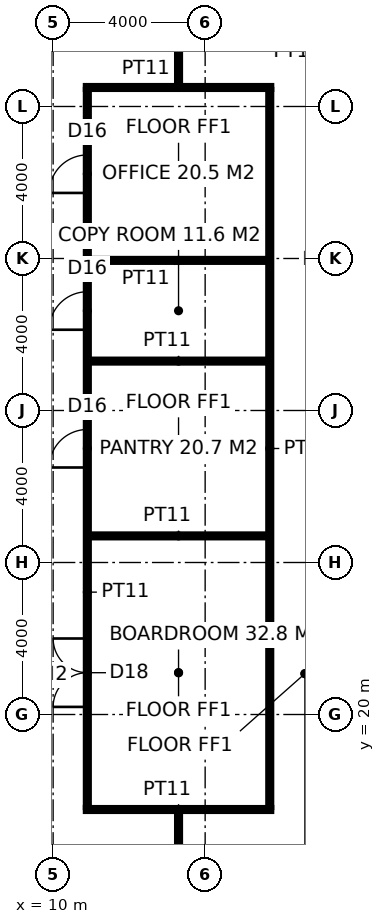
"""IFC4 building model, lengths in metres.
Left out: names, types, materials, properties, quantities, classifications, styles, units other than length and angle.
Written with IfcOpenShell. Run it as: python <this file> out.ifc"""

import sys

from ifc_helpers import new_model, si_unit, direction, frame, frame_2d, origin, place, context, subcontext, project, spatial, rectangle, extrude, element, fill, save


model = new_model("IFC4")
c1 = context("Model", 3, precision=1e-05, world=origin(), true_north=direction((0.0, 1.0)))
c2 = subcontext(c1, "Body", "Model", "MODEL_VIEW")
j1 = project(units=[si_unit("LENGTHUNIT", "METRE"), si_unit("PLANEANGLEUNIT", "RADIAN")], contexts=[c1])
p1 = place(None, origin())
s1 = spatial("IfcSite", under=j1, at=p1, CompositionType="ELEMENT")
p2 = place(p1, origin())
s2 = spatial("IfcBuilding", under=s1, at=p2, CompositionType="ELEMENT")
p3 = place(p2, frame((0.0, 0.0, 274.2)))
s3 = spatial("IfcBuildingStorey", under=s2, at=p3, CompositionType="ELEMENT", Elevation=274.2)
p4 = place(p3, frame((10.85, 17.5, 0.0), z_axis=(0.0, 0.0, 1.0), x_axis=(1.0, 0.0, 0.0)))
e1 = element("IfcWall", 1, at=p4, inside=s3, PredefinedType="PARTITIONING", context=c2, shape_type="SweptSolid", body=[
    extrude(rectangle(XDim=4.9, YDim=0.1, at=frame_2d((2.45, 0.0))), origin(), (0.0, 0.0, 1.0), 3.85),
])
for number, where, z_axis, x_axis in (
    (2, (10.95, 24.7, 0.0), (0.0, 0.0, 1.0), (1.0, 0.0, 0.0)),
    (3, (10.95, 29.3, 0.0), (0.0, 0.0, 1.0), (1.0, 0.0, 0.0)),
):
    element("IfcWall", number, at=place(p3, frame(where, z_axis=z_axis, x_axis=x_axis)), inside=s3, PredefinedType="PARTITIONING", context=c2, shape_type="SweptSolid", body=[
        extrude(rectangle(XDim=4.7, YDim=0.1, at=frame_2d((2.35, 0.0))), origin(), (0.0, 0.0, 1.0), 3.85),
    ])
p5 = place(p3, frame((10.95, 31.95, 0.0), z_axis=(0.0, 0.0, 1.0), x_axis=(1.0, 0.0, 0.0)))
e4 = element("IfcWall", 4, at=p5, inside=s3, PredefinedType="PARTITIONING", context=c2, shape_type="SweptSolid", body=[
    extrude(rectangle(XDim=4.7, YDim=0.1, at=frame_2d((2.35, 0.0))), origin(), (0.0, 0.0, 1.0), 2.95),
])
p6 = place(p3, frame((10.85, 36.5, 0.0), z_axis=(0.0, 0.0, 1.0), x_axis=(1.0, 0.0, 0.0)))
e5 = element("IfcWall", 5, at=p6, inside=s3, PredefinedType="PARTITIONING", context=c2, shape_type="SweptSolid", body=[
    extrude(rectangle(XDim=4.9, YDim=0.1, at=frame_2d((2.45, 0.0))), origin(), (0.0, 0.0, 1.0), 2.85),
])
p7 = place(p3, frame((10.9, 17.55, 0.0), z_axis=(0.0, 0.0, 1.0), x_axis=(0.0, 1.0, 0.0)))
e6 = element("IfcWall", 6, at=p7, inside=s3, PredefinedType="PARTITIONING", context=c2, shape_type="SweptSolid", body=[
    extrude(rectangle(XDim=18.9, YDim=0.1, at=frame_2d((9.45, 0.0))), origin(), (0.0, 0.0, 1.0), 3.85),
])
p8 = place(p7, frame((2.65, 0.0, 0.0)))
e7 = element("IfcOpeningElement", 7, at=p8, cuts=e6, PredefinedType="OPENING", context=c2, shape_type="SweptSolid", body=[
    extrude(rectangle(XDim=1.8, YDim=2.4, at=frame_2d((0.9, 1.2))), frame((0.0, 0.06, 0.0), z_axis=(0.0, -1.0, 0.0), x_axis=(1.0, 0.0, 0.0)), (0.0, 0.0, 1.0), 0.12),
])
p9 = place(p7, frame((8.95, 0.0, 0.0)))
e8 = element("IfcOpeningElement", 8, at=p9, cuts=e6, PredefinedType="OPENING", context=c2, shape_type="SweptSolid", body=[
    extrude(rectangle(XDim=1.0, YDim=2.2, at=frame_2d((0.5, 1.1))), frame((0.0, 0.06, 0.0), z_axis=(0.0, -1.0, 0.0), x_axis=(1.0, 0.0, 0.0)), (0.0, 0.0, 1.0), 0.12),
])
p10 = place(p7, frame((12.575, 0.0, 0.0)))
e9 = element("IfcOpeningElement", 9, at=p10, cuts=e6, PredefinedType="OPENING", context=c2, shape_type="SweptSolid", body=[
    extrude(rectangle(XDim=1.0, YDim=2.2, at=frame_2d((0.5, 1.1))), frame((0.0, 0.06, 0.0), z_axis=(0.0, -1.0, 0.0), x_axis=(1.0, 0.0, 0.0)), (0.0, 0.0, 1.0), 0.12),
])
p11 = place(p7, frame((16.175, 0.0, 0.0)))
e10 = element("IfcOpeningElement", 10, at=p11, cuts=e6, PredefinedType="OPENING", context=c2, shape_type="SweptSolid", body=[
    extrude(rectangle(XDim=1.0, YDim=2.2, at=frame_2d((0.5, 1.1))), frame((0.0, 0.06, 0.0), z_axis=(0.0, -1.0, 0.0), x_axis=(1.0, 0.0, 0.0)), (0.0, 0.0, 1.0), 0.12),
])
p12 = place(p3, frame((15.7, 17.55, 0.0), z_axis=(0.0, 0.0, 1.0), x_axis=(0.0, 1.0, 0.0)))
e11 = element("IfcWall", 11, at=p12, inside=s3, PredefinedType="PARTITIONING", context=c2, shape_type="SweptSolid", body=[
    extrude(rectangle(XDim=18.9, YDim=0.1, at=frame_2d((9.45, 0.0))), origin(), (0.0, 0.0, 1.0), 3.85),
])
p13 = place(p3, frame((13.3, 4.3, 0.0), z_axis=(0.0, 0.0, 1.0), x_axis=(0.0, 1.0, 0.0)))
e12 = element("IfcWall", 12, at=p13, inside=s3, PredefinedType="PARTITIONING", context=c2, shape_type="SweptSolid", body=[
    extrude(rectangle(XDim=13.15, YDim=0.1, at=frame_2d((6.575, 0.0))), origin(), (0.0, 0.0, 1.0), 3.85),
])
p14 = place(p13, frame((6.075, 0.0, 0.0)))
e13 = element("IfcOpeningElement", 13, at=p14, cuts=e12, PredefinedType="OPENING", context=c2, shape_type="SweptSolid", body=[
    extrude(rectangle(XDim=1.0, YDim=2.2, at=frame_2d((0.5, 1.1))), frame((0.0, 0.06, 0.0), z_axis=(0.0, -1.0, 0.0), x_axis=(1.0, 0.0, 0.0)), (0.0, 0.0, 1.0), 0.12),
])
p15 = place(p3, frame((13.3, 36.55, 0.0), z_axis=(0.0, 0.0, 1.0), x_axis=(0.0, 1.0, 0.0)))
e14 = element("IfcWall", 14, at=p15, inside=s3, PredefinedType="PARTITIONING", context=c2, shape_type="SweptSolid", body=[
    extrude(rectangle(XDim=7.15, YDim=0.1, at=frame_2d((3.575, 0.0))), origin(), (0.0, 0.0, 1.0), 3.85),
])
p16 = place(p8, origin())
e15 = element("IfcDoor", 15, at=p16, inside=s3, OperationType="DOUBLE_DOOR_DOUBLE_SWING", PredefinedType="DOOR", context=c2, shape_type="SweptSolid", body=[
    extrude(rectangle(XDim=1.8, YDim=2.4, at=frame_2d((0.9, 1.2))), frame((0.0, 0.025, 0.0), z_axis=(0.0, -1.0, 0.0), x_axis=(1.0, 0.0, 0.0)), (0.0, 0.0, 1.0), 0.05),
])
fill(e7, e15)
p17 = place(p9, origin())
e16 = element("IfcDoor", 16, at=p17, inside=s3, OperationType="SINGLE_SWING_LEFT", PredefinedType="DOOR", context=c2, shape_type="SweptSolid", body=[
    extrude(rectangle(XDim=1.0, YDim=2.2, at=frame_2d((0.5, 1.1))), frame((0.0, 0.025, 0.0), z_axis=(0.0, -1.0, 0.0), x_axis=(1.0, 0.0, 0.0)), (0.0, 0.0, 1.0), 0.05),
])
fill(e8, e16)
p18 = place(p10, origin())
e17 = element("IfcDoor", 17, at=p18, inside=s3, OperationType="SINGLE_SWING_LEFT", PredefinedType="DOOR", context=c2, shape_type="SweptSolid", body=[
    extrude(rectangle(XDim=1.0, YDim=2.2, at=frame_2d((0.5, 1.1))), frame((0.0, 0.025, 0.0), z_axis=(0.0, -1.0, 0.0), x_axis=(1.0, 0.0, 0.0)), (0.0, 0.0, 1.0), 0.05),
])
fill(e9, e17)
p19 = place(p11, origin())
e18 = element("IfcDoor", 18, at=p19, inside=s3, OperationType="SINGLE_SWING_LEFT", PredefinedType="DOOR", context=c2, shape_type="SweptSolid", body=[
    extrude(rectangle(XDim=1.0, YDim=2.2, at=frame_2d((0.5, 1.1))), frame((0.0, 0.025, 0.0), z_axis=(0.0, -1.0, 0.0), x_axis=(1.0, 0.0, 0.0)), (0.0, 0.0, 1.0), 0.05),
])
fill(e10, e18)
save(model, sys.argv[1])
